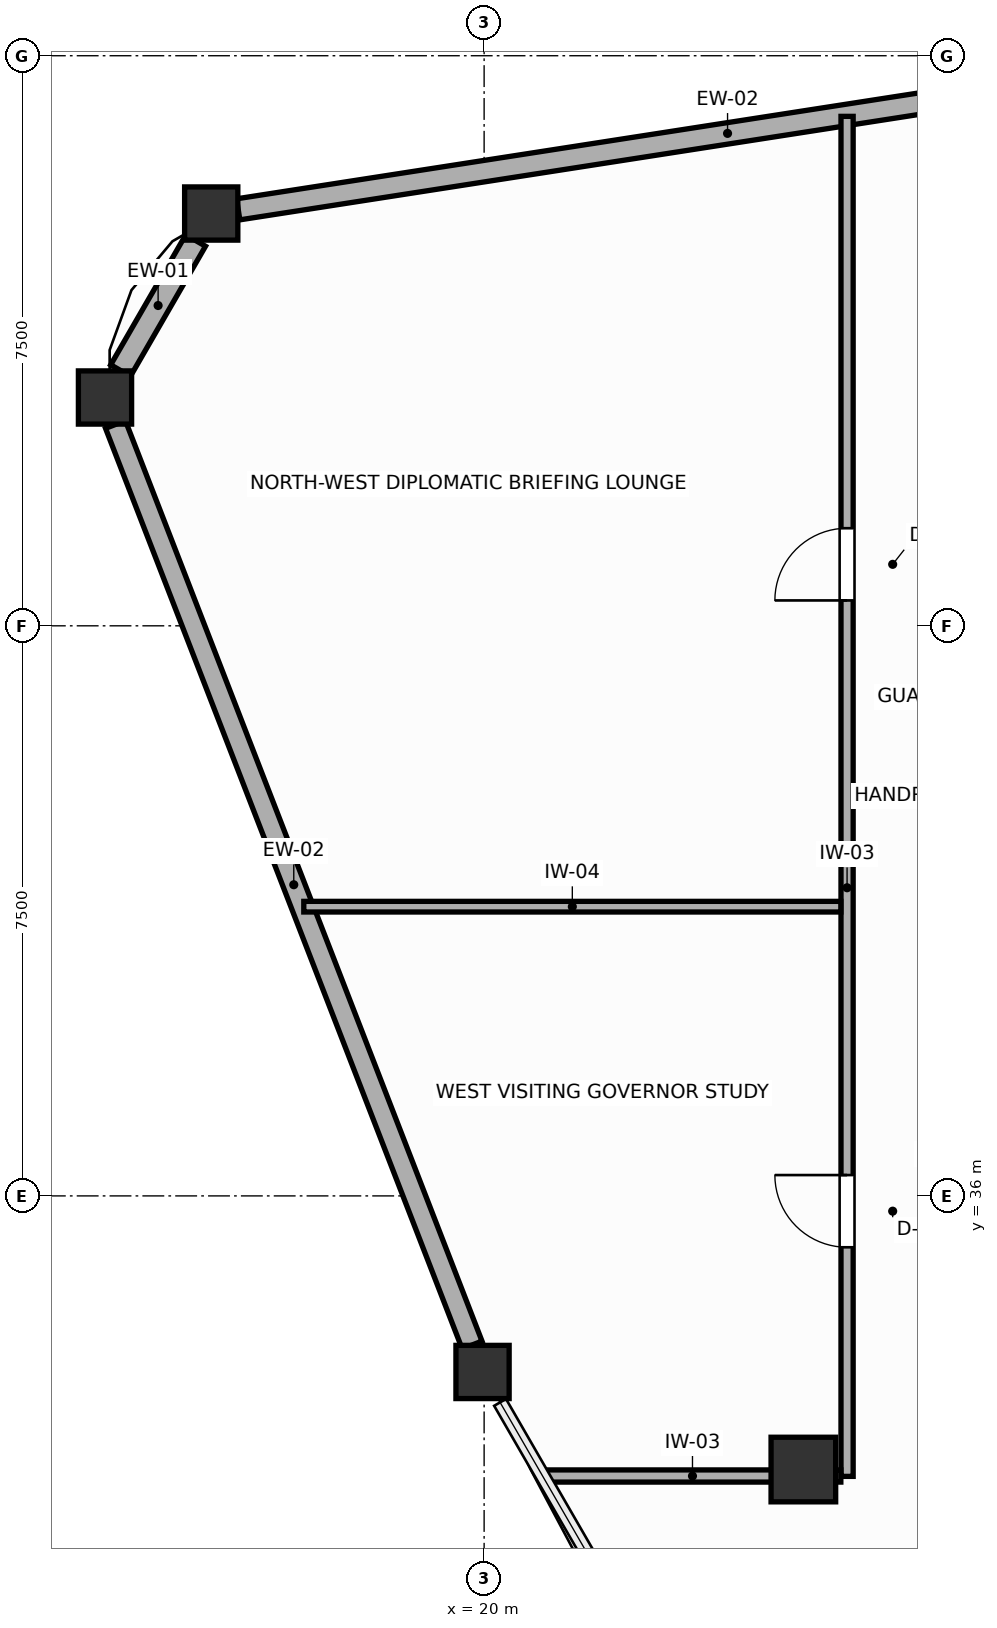
"""IFC4 building model, lengths in metres.
Left out: names, types, materials, properties, quantities, classifications, styles, units other than length and angle.
Written with IfcOpenShell. Run it as: python <this file> out.ifc"""

import sys

from ifc_helpers import new_model, si_unit, direction, frame, frame_2d, origin, origin_2d, place, context, subcontext, project, spatial, rectangle, extrude, source, transform, mapped, element, fill, save


model = new_model("IFC4")
c1 = context("Model", 3, precision=1e-05, world=origin(), true_north=direction((0.0, 1.0)))
c2 = subcontext(c1, "Body", "Model", "MODEL_VIEW")
j1 = project(units=[si_unit("LENGTHUNIT", "METRE"), si_unit("PLANEANGLEUNIT", "RADIAN")], contexts=[c1])
p1 = place(None, origin())
s1 = spatial("IfcSite", under=j1, at=p1, CompositionType="ELEMENT")
p2 = place(p1, origin())
s2 = spatial("IfcBuilding", under=s1, at=p2, CompositionType="ELEMENT")
p3 = place(p2, frame((0.0, 0.0, 250.2)))
s3 = spatial("IfcBuildingStorey", under=s2, at=p3, CompositionType="ELEMENT", Elevation=250.2)
m1 = source(origin(), c2, "Body", "SweptSolid", [
    extrude(rectangle(XDim=0.85, YDim=0.85, at=origin_2d()), origin(), (0.0, 0.0, 1.0), 3.6),
])
p4 = place(p3, frame((24.2, 32.4, 0.0), z_axis=(0.0, 0.0, 1.0), x_axis=(1.0, 0.0, 0.0)))
e1 = element("IfcColumn", 1, at=p4, inside=s3, PredefinedType="COLUMN", context=c2, shape_type="MappedRepresentation", body=[
    mapped(m1, transform((0.0, 0.0, 0.0), scale=1.0)),
])
m2 = source(origin(), c2, "Body", "SweptSolid", [
    extrude(rectangle(XDim=0.7, YDim=0.7, at=origin_2d()), origin(), (0.0, 0.0, 1.0), 3.6),
])
for number, where, z_axis, x_axis in (
    (2, (16.41, 48.924, 0.0), (0.0, 0.0, 1.0), (1.0, 0.0, 0.0)),
    (3, (15.012, 46.504, 0.0), (0.0, 0.0, 1.0), (1.0, 0.0, 0.0)),
    (4, (19.979, 33.684, 0.0), (0.0, 0.0, 1.0), (1.0, 0.0, 0.0)),
):
    element("IfcColumn", number, at=place(p3, frame(where, z_axis=z_axis, x_axis=x_axis)), inside=s3, PredefinedType="COLUMN", context=c2, shape_type="MappedRepresentation", body=[
        mapped(m2, transform((0.0, 0.0, 0.0), scale=1.0)),
    ])
p5 = place(p3, frame((29.641, 50.978, 0.0), z_axis=(0.0, 0.0, 1.0), x_axis=(-0.988170476673, -0.153359411293, 0.0)))
e5 = element("IfcWall", 5, at=p5, inside=s3, PredefinedType="SOLIDWALL", context=c2, shape_type="SweptSolid", body=[
    extrude(rectangle(XDim=13.03, YDim=0.28, at=frame_2d((6.515, 0.0))), origin(), (0.0, 0.0, 1.0), 1.88),
])
p6 = place(p3, frame((16.205, 48.569, 0.0), z_axis=(0.0, 0.0, 1.0), x_axis=(-0.499915072674, -0.866074431047, 0.0)))
e6 = element("IfcWall", 6, at=p6, inside=s3, PredefinedType="SOLIDWALL", context=c2, shape_type="SweptSolid", body=[
    extrude(rectangle(XDim=1.975, YDim=0.3, at=frame_2d((0.987, 0.0))), origin(), (0.0, 0.0, 1.0), 1.88),
])
p7 = place(p3, frame((15.15, 46.149, 0.0), z_axis=(0.0, 0.0, 1.0), x_axis=(0.361269378379, -0.93246149317, 0.0)))
e7 = element("IfcWall", 7, at=p7, inside=s3, PredefinedType="SOLIDWALL", context=c2, shape_type="SweptSolid", body=[
    extrude(rectangle(XDim=12.987, YDim=0.28, at=frame_2d((6.494, 0.0))), origin(), (0.0, 0.0, 1.0), 1.88),
])
p8 = place(p3, frame((24.775, 32.31, 0.0), z_axis=(0.0, 0.0, 1.0), x_axis=(0.0, 1.0, 0.0)))
e8 = element("IfcWall", 8, at=p8, inside=s3, PredefinedType="PARTITIONING", context=c2, shape_type="SweptSolid", body=[
    extrude(rectangle(XDim=17.892, YDim=0.16, at=frame_2d((8.946, 0.0))), origin(), (0.0, 0.0, 1.0), 3.41),
])
p9 = place(p8, frame((3.014, 0.0, 0.0)))
e9 = element("IfcOpeningElement", 9, at=p9, cuts=e8, PredefinedType="OPENING", context=c2, shape_type="SweptSolid", body=[
    extrude(rectangle(XDim=0.95, YDim=2.05, at=frame_2d((0.475, 1.025))), frame((0.0, 0.09, 0.0), z_axis=(0.0, -1.0, 0.0), x_axis=(1.0, 0.0, 0.0)), (0.0, 0.0, 1.0), 0.18),
])
p10 = place(p8, frame((11.524, 0.0, 0.0)))
e10 = element("IfcOpeningElement", 10, at=p10, cuts=e8, PredefinedType="OPENING", context=c2, shape_type="SweptSolid", body=[
    extrude(rectangle(XDim=0.95, YDim=2.05, at=frame_2d((0.475, 1.025))), frame((0.0, 0.09, 0.0), z_axis=(0.0, -1.0, 0.0), x_axis=(1.0, 0.0, 0.0)), (0.0, 0.0, 1.0), 0.18),
])
p11 = place(p3, frame((20.789, 32.315, 0.0), z_axis=(0.0, 0.0, 1.0), x_axis=(1.0, 0.0, 0.0)))
e11 = element("IfcWall", 11, at=p11, inside=s3, PredefinedType="PARTITIONING", context=c2, shape_type="SweptSolid", body=[
    extrude(rectangle(XDim=3.904, YDim=0.16, at=frame_2d((1.952, 0.0))), origin(), (0.0, 0.0, 1.0), 2.17),
])
p12 = place(p3, frame((17.627, 39.805, 0.0), z_axis=(0.0, 0.0, 1.0), x_axis=(1.0, 0.0, 0.0)))
e12 = element("IfcWall", 12, at=p12, inside=s3, PredefinedType="PARTITIONING", context=c2, shape_type="SweptSolid", body=[
    extrude(rectangle(XDim=7.066, YDim=0.14, at=frame_2d((3.533, 0.0))), origin(), (0.0, 0.0, 1.0), 3.41),
])
p13 = place(p9, origin())
e13 = element("IfcDoor", 13, at=p13, inside=s3, OperationType="SINGLE_SWING_RIGHT", PredefinedType="DOOR", context=c2, shape_type="SweptSolid", body=[
    extrude(rectangle(XDim=0.95, YDim=2.05, at=frame_2d((0.475, 1.025))), frame((0.0, 0.025, 0.0), z_axis=(0.0, -1.0, 0.0), x_axis=(1.0, 0.0, 0.0)), (0.0, 0.0, 1.0), 0.05),
])
fill(e9, e13)
p14 = place(p10, origin())
e14 = element("IfcDoor", 14, at=p14, inside=s3, OperationType="SINGLE_SWING_LEFT", PredefinedType="DOOR", context=c2, shape_type="SweptSolid", body=[
    extrude(rectangle(XDim=0.95, YDim=2.05, at=frame_2d((0.475, 1.025))), frame((0.0, 0.025, 0.0), z_axis=(0.0, -1.0, 0.0), x_axis=(1.0, 0.0, 0.0)), (0.0, 0.0, 1.0), 0.05),
])
fill(e10, e14)
save(model, sys.argv[1])
